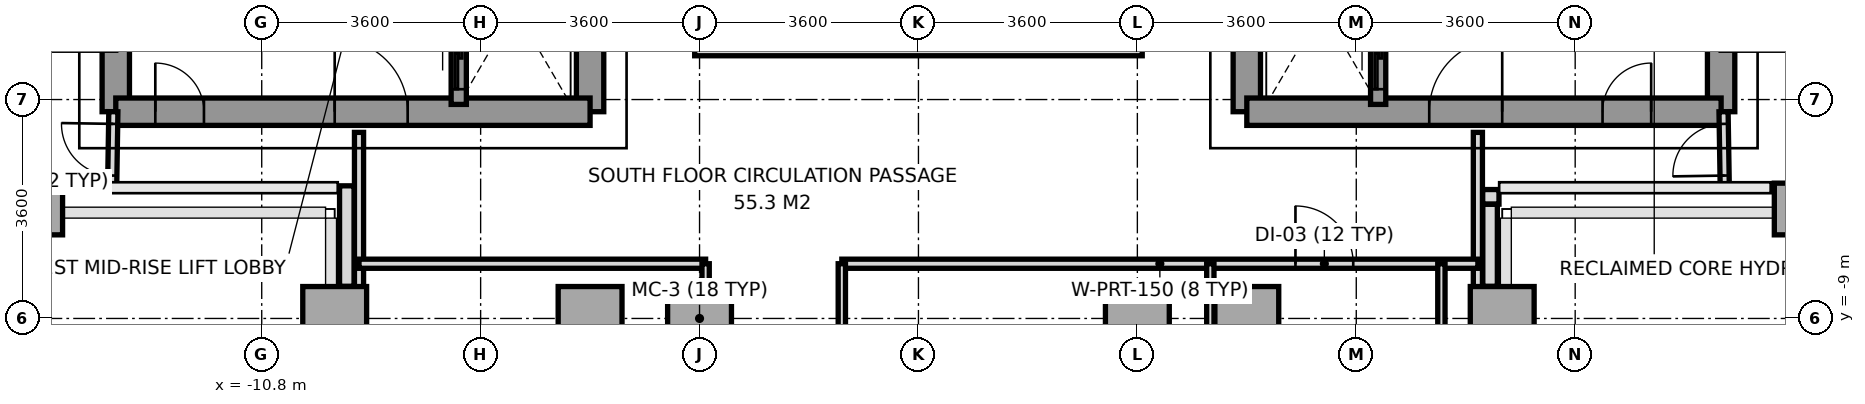
"""IFC4 building model, lengths in metres.
Left out: names, types, materials, properties, quantities, classifications, styles, units other than length and angle.
Written with IfcOpenShell. Run it as: python <this file> out.ifc"""

import sys

from ifc_helpers import new_model, si_unit, direction, frame, frame_2d, origin, origin_2d, place, context, subcontext, project, spatial, rectangle, extrude, source, transform, mapped, element, fill, save


model = new_model("IFC4")
c1 = context("Model", 3, precision=1e-05, world=origin(), true_north=direction((0.0, 1.0)))
c2 = subcontext(c1, "Body", "Model", "MODEL_VIEW")
j1 = project(units=[si_unit("LENGTHUNIT", "METRE"), si_unit("PLANEANGLEUNIT", "RADIAN")], contexts=[c1])
p1 = place(None, origin())
s1 = spatial("IfcSite", under=j1, at=p1, CompositionType="ELEMENT")
p2 = place(p1, origin())
s2 = spatial("IfcBuilding", under=s1, at=p2, CompositionType="ELEMENT")
p3 = place(p2, frame((0.0, 0.0, 110.8)))
s3 = spatial("IfcBuildingStorey", under=s2, at=p3, CompositionType="ELEMENT", Elevation=110.8)
m1 = source(origin(), c2, "Body", "SweptSolid", [
    extrude(rectangle(XDim=0.65, YDim=0.85, at=origin_2d()), origin(), (0.0, 0.0, 1.0), 3.2),
])
p4 = place(p3, frame((-14.4, -7.2, 0.0), z_axis=(0.0, 0.0, 1.0), x_axis=(1.0, 0.0, 0.0)))
e1 = element("IfcColumn", 1, at=p4, inside=s3, PredefinedType="COLUMN", context=c2, shape_type="MappedRepresentation", body=[
    mapped(m1, transform((0.0, 0.0, 0.0), x_axis=(1.0, 0.0, 0.0), y_axis=(0.0, 1.0, 0.0), z_axis=(0.0, 0.0, 1.0), scale=1.0)),
])
m2 = source(origin(), c2, "Body", "SweptSolid", [
    extrude(rectangle(XDim=1.05, YDim=1.05, at=origin_2d()), origin(), (0.0, 0.0, 1.0), 3.2),
])
for number, where, z_axis, x_axis in (
    (2, (-9.6, -9.0, 0.0), (0.0, 0.0, 1.0), (1.0, 0.0, 0.0)),
    (3, (-5.4, -9.0, 0.0), (0.0, 0.0, 1.0), (1.0, 0.0, 0.0)),
    (4, (-3.6, -9.0, 0.0), (0.0, 0.0, 1.0), (1.0, 0.0, 0.0)),
    (5, (3.6, -9.0, 0.0), (0.0, 0.0, 1.0), (1.0, 0.0, 0.0)),
    (6, (5.4, -9.0, 0.0), (0.0, 0.0, 1.0), (1.0, 0.0, 0.0)),
    (7, (9.6, -9.0, 0.0), (0.0, 0.0, 1.0), (1.0, 0.0, 0.0)),
):
    element("IfcColumn", number, at=place(p3, frame(where, z_axis=z_axis, x_axis=x_axis)), inside=s3, PredefinedType="COLUMN", context=c2, shape_type="MappedRepresentation", body=[
        mapped(m2, transform((0.0, 0.0, 0.0), x_axis=(1.0, 0.0, 0.0), y_axis=(0.0, 1.0, 0.0), z_axis=(0.0, 0.0, 1.0), scale=1.0)),
    ])
p5 = place(p3, frame((14.4, -7.2, 0.0), z_axis=(0.0, 0.0, 1.0), x_axis=(1.0, 0.0, 0.0)))
e8 = element("IfcColumn", 8, at=p5, inside=s3, PredefinedType="COLUMN", context=c2, shape_type="MappedRepresentation", body=[
    mapped(m1, transform((0.0, 0.0, 0.0), x_axis=(1.0, 0.0, 0.0), y_axis=(0.0, 1.0, 0.0), z_axis=(0.0, 0.0, 1.0), scale=1.0)),
])
p6 = place(p3, frame((9.547, -7.0, 0.0), z_axis=(0.0, 0.0, 1.0), x_axis=(-1.0, 0.0, 0.0)))
e9 = element("IfcWall", 9, at=p6, inside=s3, PredefinedType="PARAPET", context=c2, shape_type="SweptSolid", body=[
    extrude(rectangle(XDim=0.269, YDim=0.24, at=frame_2d((0.135, 0.0))), origin(), (0.0, 0.0, 1.0), 1.15),
])
p7 = place(p3, frame((9.4, -7.123, 0.0), z_axis=(0.0, 0.0, 1.0), x_axis=(0.0, -1.0, 0.0)))
e10 = element("IfcWall", 10, at=p7, inside=s3, PredefinedType="PARAPET", context=c2, shape_type="SweptSolid", body=[
    extrude(rectangle(XDim=1.349, YDim=0.24, at=frame_2d((0.674, 0.0))), origin(), (0.0, 0.0, 1.0), 1.15),
])
p8 = place(p3, frame((-9.4, -8.472, 0.0), z_axis=(0.0, 0.0, 1.0), x_axis=(0.0, 1.0, 0.0)))
e11 = element("IfcWall", 11, at=p8, inside=s3, PredefinedType="PARAPET", context=c2, shape_type="SweptSolid", body=[
    extrude(rectangle(XDim=1.653, YDim=0.24, at=frame_2d((0.827, 0.0))), origin(), (0.0, 0.0, 1.0), 1.15),
])
p9 = place(p3, frame((-13.2, -5.6, 0.0), z_axis=(0.0, 0.0, 1.0), x_axis=(0.0, 1.0, 0.0)))
e12 = element("IfcWall", 12, at=p9, inside=s3, PredefinedType="SHEAR", context=c2, shape_type="SweptSolid", body=[
    extrude(rectangle(XDim=11.2, YDim=0.45, at=frame_2d((5.6, 0.0))), origin(), (0.0, 0.0, 1.0), 3.2),
])
p10 = place(p3, frame((-5.4, -5.6, 0.0), z_axis=(0.0, 0.0, 1.0), x_axis=(0.0, 1.0, 0.0)))
e13 = element("IfcWall", 13, at=p10, inside=s3, PredefinedType="SHEAR", context=c2, shape_type="SweptSolid", body=[
    extrude(rectangle(XDim=12.5, YDim=0.45, at=frame_2d((6.25, 0.0))), origin(), (0.0, 0.0, 1.0), 3.2),
])
p11 = place(p10, frame((4.55, 0.0, 0.0)))
e14 = element("IfcOpeningElement", 14, at=p11, cuts=e13, PredefinedType="OPENING", context=c2, shape_type="SweptSolid", body=[
    extrude(rectangle(XDim=1.2, YDim=2.2, at=frame_2d((0.6, 1.1))), frame((0.0, 0.235, 0.0), z_axis=(0.0, -1.0, 0.0), x_axis=(1.0, 0.0, 0.0)), (0.0, 0.0, 1.0), 0.47),
])
p12 = place(p10, frame((6.86, 0.0, 0.0)))
e15 = element("IfcOpeningElement", 15, at=p12, cuts=e13, PredefinedType="OPENING", context=c2, shape_type="SweptSolid", body=[
    extrude(rectangle(XDim=0.8, YDim=2.1, at=frame_2d((0.4, 1.05))), frame((0.0, 0.235, 0.0), z_axis=(0.0, -1.0, 0.0), x_axis=(1.0, 0.0, 0.0)), (0.0, 0.0, 1.0), 0.47),
])
p13 = place(p10, frame((7.88, 0.0, 0.0)))
e16 = element("IfcOpeningElement", 16, at=p13, cuts=e13, PredefinedType="OPENING", context=c2, shape_type="SweptSolid", body=[
    extrude(rectangle(XDim=0.8, YDim=2.1, at=frame_2d((0.4, 1.05))), frame((0.0, 0.235, 0.0), z_axis=(0.0, -1.0, 0.0), x_axis=(1.0, 0.0, 0.0)), (0.0, 0.0, 1.0), 0.47),
])
p14 = place(p3, frame((-13.2, -5.6, 0.0), z_axis=(0.0, 0.0, 1.0), x_axis=(1.0, 0.0, 0.0)))
e17 = element("IfcWall", 17, at=p14, inside=s3, PredefinedType="SHEAR", context=c2, shape_type="SweptSolid", body=[
    extrude(rectangle(XDim=7.8, YDim=0.45, at=frame_2d((3.9, 0.0))), origin(), (0.0, 0.0, 1.0), 3.2),
])
p15 = place(p14, frame((3.6, 0.0, 0.0)))
e18 = element("IfcOpeningElement", 18, at=p15, cuts=e17, PredefinedType="OPENING", context=c2, shape_type="SweptSolid", body=[
    extrude(rectangle(XDim=1.2, YDim=2.2, at=frame_2d((0.6, 1.1))), frame((0.0, 0.235, 0.0), z_axis=(0.0, -1.0, 0.0), x_axis=(1.0, 0.0, 0.0)), (0.0, 0.0, 1.0), 0.47),
])
p16 = place(p14, frame((0.65, 0.0, 0.0)))
e19 = element("IfcOpeningElement", 19, at=p16, cuts=e17, PredefinedType="OPENING", context=c2, shape_type="SweptSolid", body=[
    extrude(rectangle(XDim=0.8, YDim=2.1, at=frame_2d((0.4, 1.05))), frame((0.0, 0.235, 0.0), z_axis=(0.0, -1.0, 0.0), x_axis=(1.0, 0.0, 0.0)), (0.0, 0.0, 1.0), 0.47),
])
p17 = place(p3, frame((13.2, -5.6, 0.0), z_axis=(0.0, 0.0, 1.0), x_axis=(0.0, 1.0, 0.0)))
e20 = element("IfcWall", 20, at=p17, inside=s3, PredefinedType="SHEAR", context=c2, shape_type="SweptSolid", body=[
    extrude(rectangle(XDim=11.2, YDim=0.45, at=frame_2d((5.6, 0.0))), origin(), (0.0, 0.0, 1.0), 3.2),
])
p18 = place(p3, frame((5.4, -5.6, 0.0), z_axis=(0.0, 0.0, 1.0), x_axis=(0.0, 1.0, 0.0)))
e21 = element("IfcWall", 21, at=p18, inside=s3, PredefinedType="SHEAR", context=c2, shape_type="SweptSolid", body=[
    extrude(rectangle(XDim=12.5, YDim=0.45, at=frame_2d((6.25, 0.0))), origin(), (0.0, 0.0, 1.0), 3.2),
])
p19 = place(p18, frame((4.55, 0.0, 0.0)))
e22 = element("IfcOpeningElement", 22, at=p19, cuts=e21, PredefinedType="OPENING", context=c2, shape_type="SweptSolid", body=[
    extrude(rectangle(XDim=1.2, YDim=2.2, at=frame_2d((0.6, 1.1))), frame((0.0, 0.235, 0.0), z_axis=(0.0, -1.0, 0.0), x_axis=(1.0, 0.0, 0.0)), (0.0, 0.0, 1.0), 0.47),
])
p20 = place(p3, frame((5.4, -5.6, 0.0), z_axis=(0.0, 0.0, 1.0), x_axis=(1.0, 0.0, 0.0)))
e23 = element("IfcWall", 23, at=p20, inside=s3, PredefinedType="SHEAR", context=c2, shape_type="SweptSolid", body=[
    extrude(rectangle(XDim=7.8, YDim=0.45, at=frame_2d((3.9, 0.0))), origin(), (0.0, 0.0, 1.0), 3.2),
])
p21 = place(p20, frame((3.0, 0.0, 0.0)))
e24 = element("IfcOpeningElement", 24, at=p21, cuts=e23, PredefinedType="OPENING", context=c2, shape_type="SweptSolid", body=[
    extrude(rectangle(XDim=1.2, YDim=2.2, at=frame_2d((0.6, 1.1))), frame((0.0, 0.235, 0.0), z_axis=(0.0, -1.0, 0.0), x_axis=(1.0, 0.0, 0.0)), (0.0, 0.0, 1.0), 0.47),
])
p22 = place(p20, frame((5.85, 0.0, 0.0)))
e25 = element("IfcOpeningElement", 25, at=p22, cuts=e23, PredefinedType="OPENING", context=c2, shape_type="SweptSolid", body=[
    extrude(rectangle(XDim=0.8, YDim=2.1, at=frame_2d((0.4, 1.05))), frame((0.0, 0.235, 0.0), z_axis=(0.0, -1.0, 0.0), x_axis=(1.0, 0.0, 0.0)), (0.0, 0.0, 1.0), 0.47),
])
p23 = place(p3, frame((-7.56, -5.48, 0.0), z_axis=(0.0, 0.0, 1.0), x_axis=(0.0, 1.0, 0.0)))
e26 = element("IfcWall", 26, at=p23, inside=s3, PredefinedType="SOLIDWALL", context=c2, shape_type="SweptSolid", body=[
    extrude(rectangle(XDim=1.6, YDim=0.25, at=frame_2d((0.8, 0.0))), origin(), (0.0, 0.0, 1.0), 3.2),
])
p24 = place(p23, frame((0.25, 0.0, 0.0)))
e27 = element("IfcOpeningElement", 27, at=p24, cuts=e26, PredefinedType="OPENING", context=c2, shape_type="SweptSolid", body=[
    extrude(rectangle(XDim=1.1, YDim=2.2, at=frame_2d((0.55, 1.1))), frame((0.0, 0.135, 0.0), z_axis=(0.0, -1.0, 0.0), x_axis=(1.0, 0.0, 0.0)), (0.0, 0.0, 1.0), 0.27),
])
p25 = place(p3, frame((7.56, -5.48, 0.0), z_axis=(0.0, 0.0, 1.0), x_axis=(0.0, 1.0, 0.0)))
e28 = element("IfcWall", 28, at=p25, inside=s3, PredefinedType="SOLIDWALL", context=c2, shape_type="SweptSolid", body=[
    extrude(rectangle(XDim=1.6, YDim=0.25, at=frame_2d((0.8, 0.0))), origin(), (0.0, 0.0, 1.0), 3.2),
])
p26 = place(p25, frame((0.25, 0.0, 0.0)))
e29 = element("IfcOpeningElement", 29, at=p26, cuts=e28, PredefinedType="OPENING", context=c2, shape_type="SweptSolid", body=[
    extrude(rectangle(XDim=1.1, YDim=2.2, at=frame_2d((0.55, 1.1))), frame((0.0, 0.135, 0.0), z_axis=(0.0, -1.0, 0.0), x_axis=(1.0, 0.0, 0.0)), (0.0, 0.0, 1.0), 0.27),
])
for number, where, z_axis, x_axis in (
    (30, (-9.2, -15.68, 0.0), (0.0, 0.0, 1.0), (0.0, 1.0, 0.0)),
    (31, (9.2, -15.68, 0.0), (0.0, 0.0, 1.0), (0.0, 1.0, 0.0)),
):
    element("IfcWall", number, at=place(p3, frame(where, z_axis=z_axis, x_axis=x_axis)), inside=s3, PredefinedType="PARTITIONING", context=c2, shape_type="SweptSolid", body=[
        extrude(rectangle(XDim=9.74, YDim=0.15, at=frame_2d((4.87, 0.0))), origin(), (0.0, 0.0, 1.0), 2.7),
    ])
p27 = place(p3, frame((-9.2, -8.1, 0.0), z_axis=(0.0, 0.0, 1.0), x_axis=(1.0, 0.0, 0.0)))
e32 = element("IfcWall", 32, at=p27, inside=s3, PredefinedType="PARTITIONING", context=c2, shape_type="SweptSolid", body=[
    extrude(rectangle(XDim=5.7, YDim=0.15, at=frame_2d((2.85, 0.0))), origin(), (0.0, 0.0, 1.0), 2.76),
])
p28 = place(p3, frame((-1.26, -8.1, 0.0), z_axis=(0.0, 0.0, 1.0), x_axis=(1.0, 0.0, 0.0)))
e33 = element("IfcWall", 33, at=p28, inside=s3, PredefinedType="PARTITIONING", context=c2, shape_type="SweptSolid", body=[
    extrude(rectangle(XDim=10.46, YDim=0.15, at=frame_2d((5.23, 0.0))), origin(), (0.0, 0.0, 1.0), 2.76),
])
p29 = place(p28, frame((7.46, 0.0, 0.0)))
e34 = element("IfcOpeningElement", 34, at=p29, cuts=e33, PredefinedType="OPENING", context=c2, shape_type="SweptSolid", body=[
    extrude(rectangle(XDim=0.95, YDim=2.15, at=frame_2d((0.475, 1.075))), frame((0.0, 0.085, 0.0), z_axis=(0.0, -1.0, 0.0), x_axis=(1.0, 0.0, 0.0)), (0.0, 0.0, 1.0), 0.17),
])
p30 = place(p3, frame((-3.5, -18.1, 0.0), z_axis=(0.0, 0.0, 1.0), x_axis=(0.0, 1.0, 0.0)))
e35 = element("IfcWall", 35, at=p30, inside=s3, PredefinedType="PARTITIONING", context=c2, shape_type="SweptSolid", body=[
    extrude(rectangle(XDim=10.0, YDim=0.12, at=frame_2d((5.0, 0.0))), origin(), (0.0, 0.0, 1.0), 2.7),
])
p31 = place(p30, frame((5.9, 0.0, 0.0)))
e36 = element("IfcOpeningElement", 36, at=p31, cuts=e35, PredefinedType="OPENING", context=c2, shape_type="SweptSolid", body=[
    extrude(rectangle(XDim=0.95, YDim=2.15, at=frame_2d((0.475, 1.075))), frame((0.0, 0.07, 0.0), z_axis=(0.0, -1.0, 0.0), x_axis=(1.0, 0.0, 0.0)), (0.0, 0.0, 1.0), 0.14),
])
p32 = place(p30, frame((1.2, 0.0, 0.0)))
e37 = element("IfcOpeningElement", 37, at=p32, cuts=e35, PredefinedType="OPENING", context=c2, shape_type="SweptSolid", body=[
    extrude(rectangle(XDim=0.95, YDim=2.15, at=frame_2d((0.475, 1.075))), frame((0.0, 0.07, 0.0), z_axis=(0.0, -1.0, 0.0), x_axis=(1.0, 0.0, 0.0)), (0.0, 0.0, 1.0), 0.14),
])
p33 = place(p3, frame((-1.26, -18.1, 0.0), z_axis=(0.0, 0.0, 1.0), x_axis=(0.0, 1.0, 0.0)))
e38 = element("IfcWall", 38, at=p33, inside=s3, PredefinedType="PARTITIONING", context=c2, shape_type="SweptSolid", body=[
    extrude(rectangle(XDim=10.0, YDim=0.12, at=frame_2d((5.0, 0.0))), origin(), (0.0, 0.0, 1.0), 2.7),
])
p34 = place(p33, frame((1.6, 0.0, 0.0)))
e39 = element("IfcOpeningElement", 39, at=p34, cuts=e38, PredefinedType="OPENING", context=c2, shape_type="SweptSolid", body=[
    extrude(rectangle(XDim=1.1, YDim=2.2, at=frame_2d((0.55, 1.1))), frame((0.0, 0.07, 0.0), z_axis=(0.0, -1.0, 0.0), x_axis=(1.0, 0.0, 0.0)), (0.0, 0.0, 1.0), 0.14),
])
p35 = place(p3, frame((4.8, -11.5, 0.0), z_axis=(0.0, 0.0, 1.0), x_axis=(0.0, 1.0, 0.0)))
e40 = element("IfcWall", 40, at=p35, inside=s3, PredefinedType="PARTITIONING", context=c2, shape_type="SweptSolid", body=[
    extrude(rectangle(XDim=3.4, YDim=0.12, at=frame_2d((1.7, 0.0))), origin(), (0.0, 0.0, 1.0), 3.2),
])
p36 = place(p3, frame((8.6, -11.5, 0.0), z_axis=(0.0, 0.0, 1.0), x_axis=(0.0, 1.0, 0.0)))
e41 = element("IfcWall", 41, at=p36, inside=s3, PredefinedType="PARTITIONING", context=c2, shape_type="SweptSolid", body=[
    extrude(rectangle(XDim=3.4, YDim=0.12, at=frame_2d((1.7, 0.0))), origin(), (0.0, 0.0, 1.0), 2.7),
])
p37 = place(p3, frame((-13.26, -6.85, 0.0), z_axis=(0.0, 0.0, 1.0), x_axis=(0.016013571389, 0.999871774545, 0.0)))
e42 = element("IfcWall", 42, at=p37, inside=s3, PredefinedType="PARTITIONING", context=c2, shape_type="SweptSolid", body=[
    extrude(rectangle(XDim=1.25, YDim=0.15, at=frame_2d((0.625, 0.0))), origin(), (0.0, 0.0, 1.0), 3.2),
])
p38 = place(p37, frame((0.2, 0.0, 0.0)))
e43 = element("IfcOpeningElement", 43, at=p38, cuts=e42, PredefinedType="OPENING", context=c2, shape_type="SweptSolid", body=[
    extrude(rectangle(XDim=0.85, YDim=2.1, at=frame_2d((0.425, 1.05))), frame((0.0, 0.085, 0.0), z_axis=(0.0, -1.0, 0.0), x_axis=(1.0, 0.0, 0.0)), (0.0, 0.0, 1.0), 0.17),
])
p39 = place(p3, frame((13.26, -6.85, 0.0), z_axis=(0.0, 0.0, 1.0), x_axis=(-0.016013571389, 0.999871774545, 0.0)))
e44 = element("IfcWall", 44, at=p39, inside=s3, PredefinedType="PARTITIONING", context=c2, shape_type="SweptSolid", body=[
    extrude(rectangle(XDim=1.25, YDim=0.15, at=frame_2d((0.625, 0.0))), origin(), (0.0, 0.0, 1.0), 3.2),
])
p40 = place(p39, frame((0.2, 0.0, 0.0)))
e45 = element("IfcOpeningElement", 45, at=p40, cuts=e44, PredefinedType="OPENING", context=c2, shape_type="SweptSolid", body=[
    extrude(rectangle(XDim=0.85, YDim=2.1, at=frame_2d((0.425, 1.05))), frame((0.0, 0.085, 0.0), z_axis=(0.0, -1.0, 0.0), x_axis=(1.0, 0.0, 0.0)), (0.0, 0.0, 1.0), 0.17),
])
p41 = place(p3, frame((-3.68, -4.56, 0.0), z_axis=(0.0, 0.0, 1.0), x_axis=(1.0, 0.0, 0.0)))
e46 = element("IfcWall", 46, at=p41, inside=s3, PredefinedType="PARAPET", context=c2, shape_type="SweptSolid", body=[
    extrude(rectangle(XDim=7.36, YDim=0.24, at=frame_2d((3.68, 0.0))), origin(), (0.0, 0.0, 1.0), 1.15),
])
m3 = source(origin(), c2, "Body", "SweptSolid", [
    extrude(rectangle(XDim=1.2, YDim=2.2, at=frame_2d((0.6, 1.1))), frame((0.0, 0.025, 0.0), z_axis=(0.0, -1.0, 0.0), x_axis=(1.0, 0.0, 0.0)), (0.0, 0.0, 1.0), 0.05),
])
p42 = place(p15, origin())
e47 = element("IfcDoor", 47, at=p42, inside=s3, OperationType="SINGLE_SWING_LEFT", PredefinedType="DOOR", context=c2, shape_type="MappedRepresentation", body=[
    mapped(m3, transform((0.0, 0.0, 0.0), x_axis=(1.0, 0.0, 0.0), y_axis=(0.0, 1.0, 0.0), z_axis=(0.0, 0.0, 1.0), scale=1.0)),
])
fill(e18, e47)
p43 = place(p21, origin())
e48 = element("IfcDoor", 48, at=p43, inside=s3, OperationType="SINGLE_SWING_RIGHT", PredefinedType="DOOR", context=c2, shape_type="MappedRepresentation", body=[
    mapped(m3, transform((0.0, 0.0, 0.0), x_axis=(1.0, 0.0, 0.0), y_axis=(0.0, 1.0, 0.0), z_axis=(0.0, 0.0, 1.0), scale=1.0)),
])
fill(e24, e48)
m4 = source(origin(), c2, "Body", "SweptSolid", [
    extrude(rectangle(XDim=0.8, YDim=2.1, at=frame_2d((0.4, 1.05))), frame((0.0, 0.025, 0.0), z_axis=(0.0, -1.0, 0.0), x_axis=(1.0, 0.0, 0.0)), (0.0, 0.0, 1.0), 0.05),
])
p44 = place(p16, origin())
e49 = element("IfcDoor", 49, at=p44, inside=s3, OperationType="SINGLE_SWING_LEFT", PredefinedType="DOOR", context=c2, shape_type="MappedRepresentation", body=[
    mapped(m4, transform((0.0, 0.0, 0.0), x_axis=(1.0, 0.0, 0.0), y_axis=(0.0, 1.0, 0.0), z_axis=(0.0, 0.0, 1.0), scale=1.0)),
])
fill(e19, e49)
p45 = place(p22, origin())
e50 = element("IfcDoor", 50, at=p45, inside=s3, OperationType="SINGLE_SWING_RIGHT", PredefinedType="DOOR", context=c2, shape_type="MappedRepresentation", body=[
    mapped(m4, transform((0.0, 0.0, 0.0), x_axis=(1.0, 0.0, 0.0), y_axis=(0.0, 1.0, 0.0), z_axis=(0.0, 0.0, 1.0), scale=1.0)),
])
fill(e25, e50)
m5 = source(origin(), c2, "Body", "SweptSolid", [
    extrude(rectangle(XDim=1.1, YDim=2.2, at=frame_2d((0.55, 1.1))), frame((0.0, 0.025, 0.0), z_axis=(0.0, -1.0, 0.0), x_axis=(1.0, 0.0, 0.0)), (0.0, 0.0, 1.0), 0.05),
])
p46 = place(p24, origin())
e51 = element("IfcDoor", 51, at=p46, inside=s3, OperationType="SLIDING_TO_LEFT", PredefinedType="DOOR", context=c2, shape_type="MappedRepresentation", body=[
    mapped(m5, transform((0.0, 0.0, 0.0), x_axis=(1.0, 0.0, 0.0), y_axis=(0.0, 1.0, 0.0), z_axis=(0.0, 0.0, 1.0), scale=1.0)),
])
fill(e27, e51)
p47 = place(p26, origin())
e52 = element("IfcDoor", 52, at=p47, inside=s3, OperationType="SLIDING_TO_LEFT", PredefinedType="DOOR", context=c2, shape_type="MappedRepresentation", body=[
    mapped(m5, transform((0.0, 0.0, 0.0), x_axis=(1.0, 0.0, 0.0), y_axis=(0.0, 1.0, 0.0), z_axis=(0.0, 0.0, 1.0), scale=1.0)),
])
fill(e29, e52)
m6 = source(origin(), c2, "Body", "SweptSolid", [
    extrude(rectangle(XDim=0.95, YDim=2.15, at=frame_2d((0.475, 1.075))), frame((0.0, 0.025, 0.0), z_axis=(0.0, -1.0, 0.0), x_axis=(1.0, 0.0, 0.0)), (0.0, 0.0, 1.0), 0.05),
])
p48 = place(p29, origin())
e53 = element("IfcDoor", 53, at=p48, inside=s3, OperationType="SINGLE_SWING_LEFT", PredefinedType="DOOR", context=c2, shape_type="MappedRepresentation", body=[
    mapped(m6, transform((0.0, 0.0, 0.0), x_axis=(1.0, 0.0, 0.0), y_axis=(0.0, 1.0, 0.0), z_axis=(0.0, 0.0, 1.0), scale=1.0)),
])
fill(e34, e53)
m7 = source(origin(), c2, "Body", "SweptSolid", [
    extrude(rectangle(XDim=0.85, YDim=2.1, at=frame_2d((0.425, 1.05))), frame((0.0, 0.025, 0.0), z_axis=(0.0, -1.0, 0.0), x_axis=(1.0, 0.0, 0.0)), (0.0, 0.0, 1.0), 0.05),
])
p49 = place(p38, origin())
e54 = element("IfcDoor", 54, at=p49, inside=s3, OperationType="SINGLE_SWING_RIGHT", PredefinedType="DOOR", context=c2, shape_type="MappedRepresentation", body=[
    mapped(m7, transform((0.0, 0.0, 0.0), x_axis=(1.0, 0.0, 0.0), y_axis=(0.0, 1.0, 0.0), z_axis=(0.0, 0.0, 1.0), scale=1.0)),
])
fill(e43, e54)
p50 = place(p40, origin())
e55 = element("IfcDoor", 55, at=p50, inside=s3, OperationType="SINGLE_SWING_LEFT", PredefinedType="DOOR", context=c2, shape_type="MappedRepresentation", body=[
    mapped(m7, transform((0.0, 0.0, 0.0), x_axis=(1.0, 0.0, 0.0), y_axis=(0.0, 1.0, 0.0), z_axis=(0.0, 0.0, 1.0), scale=1.0)),
])
fill(e45, e55)
save(model, sys.argv[1])
